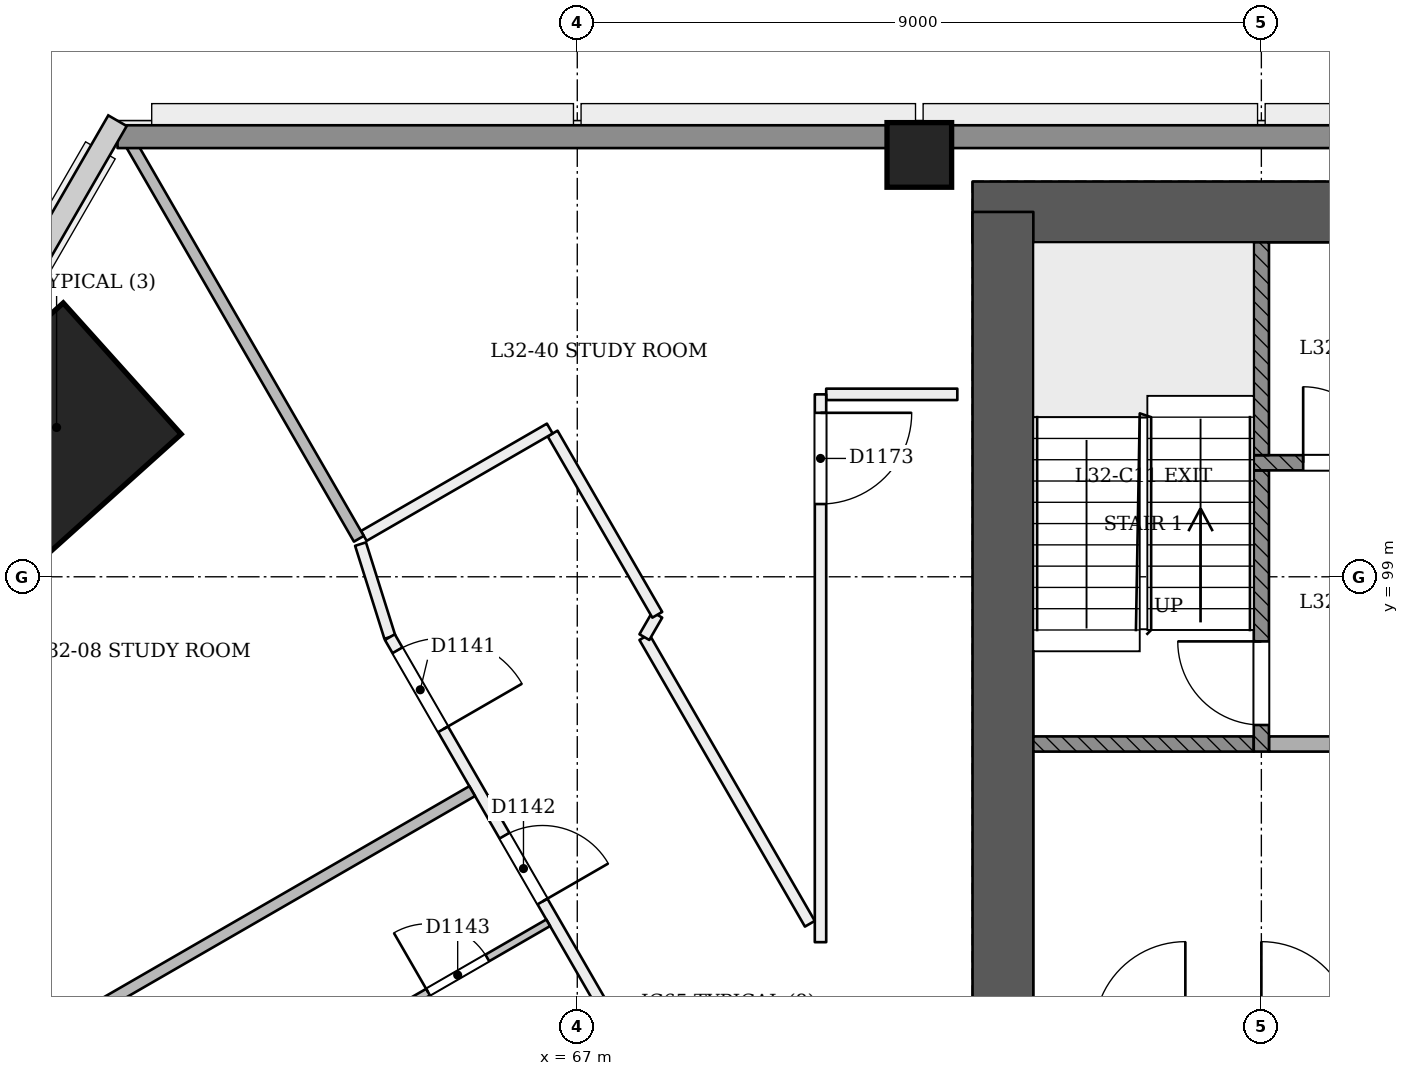
"""IFC4 building model, lengths in metres.
Left out: names, types, materials, properties, quantities, classifications, styles, units other than length and angle.
Written with IfcOpenShell. Run it as: python <this file> out.ifc"""

import sys

from ifc_helpers import new_model, si_unit, direction, frame, frame_2d, origin, origin_2d, place, context, subcontext, project, spatial, rectangle, extrude, element, fill, save


model = new_model("IFC4")
c1 = context("Model", 3, precision=1e-05, world=origin(), true_north=direction((0.0, 1.0)))
c2 = subcontext(c1, "Body", "Model", "MODEL_VIEW")
j1 = project(units=[si_unit("LENGTHUNIT", "METRE"), si_unit("PLANEANGLEUNIT", "RADIAN")], contexts=[c1])
p1 = place(None, origin())
s1 = spatial("IfcSite", under=j1, at=p1, CompositionType="ELEMENT")
p2 = place(p1, origin())
s2 = spatial("IfcBuilding", under=s1, at=p2, CompositionType="ELEMENT")
p3 = place(p2, frame((0.0, 0.0, 127.8)))
s3 = spatial("IfcBuildingStorey", under=s2, at=p3, CompositionType="ELEMENT", Elevation=127.8)
p4 = place(p3, frame((97.4, 103.8, 0.0), z_axis=(0.0, 0.0, 1.0), x_axis=(-1.0, 0.0, 0.0)))
e1 = element("IfcWall", 1, at=p4, inside=s3, PredefinedType="SHEAR", context=c2, shape_type="SweptSolid", body=[
    extrude(rectangle(XDim=25.2, YDim=0.8, at=frame_2d((12.6, 0.0))), origin(), (0.0, 0.0, 1.0), 3.6),
])
p5 = place(p3, frame((72.6, 103.8, 0.0), z_axis=(0.0, 0.0, 1.0), x_axis=(0.0, -1.0, 0.0)))
e2 = element("IfcWall", 2, at=p5, inside=s3, PredefinedType="SHEAR", context=c2, shape_type="SweptSolid", body=[
    extrude(rectangle(XDim=11.2, YDim=0.8, at=frame_2d((5.6, 0.0))), origin(), (0.0, 0.0, 1.0), 3.6),
])
p6 = place(p3, frame((60.116, 100.953, 0.0), z_axis=(0.028403739082, 0.009219352065, 0.999554016126), x_axis=(-0.865118537923, 0.501170103086, 0.019961039903)))
e3 = element("IfcColumn", 3, at=p6, inside=s3, PredefinedType="COLUMN", context=c2, shape_type="SweptSolid", body=[
    extrude(rectangle(XDim=2.32, YDim=2.32, at=origin_2d()), origin(), (0.0, 0.0, 1.0), 3.602),
])
p7 = place(p3, frame((71.5, 104.55, 0.0), z_axis=(0.0, 0.0, 1.0), x_axis=(1.0, 0.0, 0.0)))
e4 = element("IfcColumn", 4, at=p7, inside=s3, PredefinedType="COLUMN", context=c2, shape_type="SweptSolid", body=[
    extrude(rectangle(XDim=0.85, YDim=0.85, at=origin_2d()), origin(), (0.0, 0.0, 1.0), 3.6),
])
p8 = place(p3, frame((64.149, 99.43, 0.0), z_axis=(0.0, 0.0, 1.0), x_axis=(0.300548671062, -0.953766478926, 0.0)))
e5 = element("IfcWall", 5, at=p8, inside=s3, PredefinedType="PARTITIONING", context=c2, shape_type="SweptSolid", body=[
    extrude(rectangle(XDim=1.283, YDim=0.15, at=frame_2d((0.642, 0.0))), origin(), (0.0, 0.0, 1.0), 3.15),
])
p9 = place(p3, frame((64.534, 98.206, 0.0), z_axis=(0.0, 0.0, 1.0), x_axis=(0.499999603446, -0.866025632735, 0.0)))
e6 = element("IfcWall", 6, at=p9, inside=s3, PredefinedType="PARTITIONING", context=c2, shape_type="SweptSolid", body=[
    extrude(rectangle(XDim=40.592, YDim=0.15, at=frame_2d((20.296, 0.0))), origin(), (0.0, 0.0, 1.0), 2.75),
])
p10 = place(p9, frame((0.2, 0.0, 0.0)))
e7 = element("IfcOpeningElement", 7, at=p10, cuts=e6, PredefinedType="OPENING", context=c2, shape_type="SweptSolid", body=[
    extrude(rectangle(XDim=1.2, YDim=2.1, at=frame_2d((0.6, 1.05))), frame((0.0, 0.085, 0.0), z_axis=(0.0, -1.0, 0.0), x_axis=(1.0, 0.0, 0.0)), (0.0, 0.0, 1.0), 0.171),
])
p11 = place(p9, frame((3.016, 0.0, 0.0)))
e8 = element("IfcOpeningElement", 8, at=p11, cuts=e6, PredefinedType="OPENING", context=c2, shape_type="SweptSolid", body=[
    extrude(rectangle(XDim=1.0, YDim=2.1, at=frame_2d((0.5, 1.05))), frame((0.0, 0.085, 0.0), z_axis=(0.0, -1.0, 0.0), x_axis=(1.0, 0.0, 0.0)), (0.0, 0.0, 1.0), 0.171),
])
p12 = place(p9, frame((9.691, 0.0, 0.0)))
e9 = element("IfcOpeningElement", 9, at=p12, cuts=e6, PredefinedType="OPENING", context=c2, shape_type="SweptSolid", body=[
    extrude(rectangle(XDim=1.0, YDim=2.1, at=frame_2d((0.5, 1.05))), frame((0.0, 0.085, 0.0), z_axis=(0.0, -1.0, 0.0), x_axis=(1.0, 0.0, 0.0)), (0.0, 0.0, 1.0), 0.171),
])
p13 = place(p9, frame((11.901, 0.0, 0.0)))
e10 = element("IfcOpeningElement", 10, at=p13, cuts=e6, PredefinedType="OPENING", context=c2, shape_type="SweptSolid", body=[
    extrude(rectangle(XDim=1.0, YDim=2.1, at=frame_2d((0.5, 1.05))), frame((0.0, 0.085, 0.0), z_axis=(0.0, -1.0, 0.0), x_axis=(1.0, 0.0, 0.0)), (0.0, 0.0, 1.0), 0.171),
])
p14 = place(p9, frame((18.576, 0.0, 0.0)))
e11 = element("IfcOpeningElement", 11, at=p14, cuts=e6, PredefinedType="OPENING", context=c2, shape_type="SweptSolid", body=[
    extrude(rectangle(XDim=1.0, YDim=2.1, at=frame_2d((0.5, 1.05))), frame((0.0, 0.085, 0.0), z_axis=(0.0, -1.0, 0.0), x_axis=(1.0, 0.0, 0.0)), (0.0, 0.0, 1.0), 0.171),
])
p15 = place(p9, frame((22.046, 0.0, 0.0)))
e12 = element("IfcOpeningElement", 12, at=p15, cuts=e6, PredefinedType="OPENING", context=c2, shape_type="SweptSolid", body=[
    extrude(rectangle(XDim=1.0, YDim=2.1, at=frame_2d((0.5, 1.05))), frame((0.0, 0.085, 0.0), z_axis=(0.0, -1.0, 0.0), x_axis=(1.0, 0.0, 0.0)), (0.0, 0.0, 1.0), 0.171),
])
p16 = place(p9, frame((27.576, 0.0, 0.0)))
e13 = element("IfcOpeningElement", 13, at=p16, cuts=e6, PredefinedType="OPENING", context=c2, shape_type="SweptSolid", body=[
    extrude(rectangle(XDim=1.0, YDim=2.1, at=frame_2d((0.5, 1.05))), frame((0.0, 0.085, 0.0), z_axis=(0.0, -1.0, 0.0), x_axis=(1.0, 0.0, 0.0)), (0.0, 0.0, 1.0), 0.171),
])
p17 = place(p9, frame((31.046, 0.0, 0.0)))
e14 = element("IfcOpeningElement", 14, at=p17, cuts=e6, PredefinedType="OPENING", context=c2, shape_type="SweptSolid", body=[
    extrude(rectangle(XDim=1.0, YDim=2.1, at=frame_2d((0.5, 1.05))), frame((0.0, 0.085, 0.0), z_axis=(0.0, -1.0, 0.0), x_axis=(1.0, 0.0, 0.0)), (0.0, 0.0, 1.0), 0.171),
])
p18 = place(p9, frame((36.576, 0.0, 0.0)))
e15 = element("IfcOpeningElement", 15, at=p18, cuts=e6, PredefinedType="OPENING", context=c2, shape_type="SweptSolid", body=[
    extrude(rectangle(XDim=1.0, YDim=2.1, at=frame_2d((0.5, 1.05))), frame((0.0, 0.085, 0.0), z_axis=(0.0, -1.0, 0.0), x_axis=(1.0, 0.0, 0.0)), (0.0, 0.0, 1.0), 0.171),
])
p19 = place(p9, frame((39.323, 0.0, 0.0)))
e16 = element("IfcOpeningElement", 16, at=p19, cuts=e6, PredefinedType="OPENING", context=c2, shape_type="SweptSolid", body=[
    extrude(rectangle(XDim=1.0, YDim=2.1, at=frame_2d((0.5, 1.05))), frame((0.0, 0.085, 0.0), z_axis=(0.0, -1.0, 0.0), x_axis=(1.0, 0.0, 0.0)), (0.0, 0.0, 1.0), 0.171),
])
p20 = place(p3, frame((72.0, 101.4, 0.0), z_axis=(0.0, 0.0, 1.0), x_axis=(-1.0, 0.0, 0.0)))
e17 = element("IfcWall", 17, at=p20, inside=s3, PredefinedType="PARTITIONING", context=c2, shape_type="SweptSolid", body=[
    extrude(rectangle(XDim=1.725, YDim=0.15, at=frame_2d((0.863, 0.0))), origin(), (0.0, 0.0, 1.0), 3.15),
])
p21 = place(p3, frame((70.2, 101.4, 0.0), z_axis=(0.0, 0.0, 1.0), x_axis=(0.0, -1.0, 0.0)))
e18 = element("IfcWall", 18, at=p21, inside=s3, PredefinedType="PARTITIONING", context=c2, shape_type="SweptSolid", body=[
    extrude(rectangle(XDim=7.207, YDim=0.15, at=frame_2d((3.604, 0.0))), origin(), (0.0, 0.0, 1.0), 3.15),
])
p22 = place(p21, frame((0.243, 0.0, 0.0)))
e19 = element("IfcOpeningElement", 19, at=p22, cuts=e18, PredefinedType="OPENING", context=c2, shape_type="SweptSolid", body=[
    extrude(rectangle(XDim=1.2, YDim=2.1, at=frame_2d((0.6, 1.05))), frame((0.0, 0.085, 0.0), z_axis=(0.0, -1.0, 0.0), x_axis=(1.0, 0.0, 0.0)), (0.0, 0.0, 1.0), 0.171),
])
p23 = place(p3, frame((70.06, 94.435, 0.0), z_axis=(0.0, 0.0, 1.0), x_axis=(-0.499992644437, 0.866029650479, 0.0)))
e20 = element("IfcWall", 20, at=p23, inside=s3, PredefinedType="PARTITIONING", context=c2, shape_type="SweptSolid", body=[
    extrude(rectangle(XDim=4.354, YDim=0.15, at=frame_2d((2.177, 0.0))), origin(), (0.0, 0.0, 1.0), 3.15),
])
p24 = place(p3, frame((67.883, 98.206, 0.0), z_axis=(0.0, 0.0, 1.0), x_axis=(0.499390178911, 0.866377197996, 0.0)))
e21 = element("IfcWall", 21, at=p24, inside=s3, PredefinedType="PARTITIONING", context=c2, shape_type="SweptSolid", body=[
    extrude(rectangle(XDim=0.339, YDim=0.15, at=frame_2d((0.17, 0.0))), origin(), (0.0, 0.0, 1.0), 3.15),
])
p25 = place(p3, frame((68.052, 98.5, 0.0), z_axis=(0.0, 0.0, 1.0), x_axis=(-0.499991038717, 0.866030577522, 0.0)))
e22 = element("IfcWall", 22, at=p25, inside=s3, PredefinedType="PARTITIONING", context=c2, shape_type="SweptSolid", body=[
    extrude(rectangle(XDim=2.754, YDim=0.15, at=frame_2d((1.377, 0.0))), origin(), (0.0, 0.0, 1.0), 3.15),
])
p26 = place(p3, frame((66.638, 100.95, 0.0), z_axis=(0.0, 0.0, 1.0), x_axis=(-0.866048868473, -0.499959355765, 0.0)))
e23 = element("IfcWall", 23, at=p26, inside=s3, PredefinedType="PARTITIONING", context=c2, shape_type="SweptSolid", body=[
    extrude(rectangle(XDim=2.825, YDim=0.15, at=frame_2d((1.413, 0.0))), origin(), (0.0, 0.0, 1.0), 3.15),
])
p27 = place(p3, frame((60.122, 93.008, 0.0), z_axis=(0.0, 0.0, 1.0), x_axis=(0.866025401434, 0.500000004071, 0.0)))
e24 = element("IfcWall", 24, at=p27, inside=s3, PredefinedType="PARTITIONING", context=c2, shape_type="SweptSolid", body=[
    extrude(rectangle(XDim=6.345, YDim=0.15, at=frame_2d((3.173, 0.0))), origin(), (0.0, 0.0, 1.0), 2.65),
])
p28 = place(p3, frame((64.127, 99.5, 0.0), z_axis=(0.0, 0.0, 1.0), x_axis=(-0.500004896655, 0.866022576681, 0.0)))
e25 = element("IfcWall", 25, at=p28, inside=s3, PredefinedType="PARTITIONING", context=c2, shape_type="SweptSolid", body=[
    extrude(rectangle(XDim=6.235, YDim=0.15, at=frame_2d((3.118, 0.0))), origin(), (0.0, 0.0, 1.0), 2.65),
])
p29 = place(p3, frame((64.171, 93.036, 0.0), z_axis=(0.0, 0.0, 1.0), x_axis=(0.866011447264, 0.500024172624, 0.0)))
e26 = element("IfcWall", 26, at=p29, inside=s3, PredefinedType="PARTITIONING", context=c2, shape_type="SweptSolid", body=[
    extrude(rectangle(XDim=2.825, YDim=0.1, at=frame_2d((1.413, 0.0))), origin(), (0.0, 0.0, 1.0), 3.15),
])
p30 = place(p29, frame((1.0, 0.0, 0.0)))
e27 = element("IfcOpeningElement", 27, at=p30, cuts=e26, PredefinedType="OPENING", context=c2, shape_type="SweptSolid", body=[
    extrude(rectangle(XDim=0.9, YDim=2.1, at=frame_2d((0.45, 1.05))), frame((0.0, 0.061, 0.0), z_axis=(0.0, -1.0, 0.0), x_axis=(1.0, 0.0, 0.0)), (0.0, 0.0, 1.0), 0.121),
])
p31 = place(p3, frame((60.951, 104.79, 0.0), z_axis=(0.0, 0.0, 1.0), x_axis=(1.0, 0.0, 0.0)))
e28 = element("IfcWall", 28, at=p31, inside=s3, PredefinedType="SOLIDWALL", context=c2, shape_type="SweptSolid", body=[
    extrude(rectangle(XDim=48.098, YDim=0.3, at=frame_2d((24.049, 0.0))), origin(), (0.0, 0.0, 1.0), 2.65),
])
p32 = place(p3, frame((73.0, 96.8, 0.0), z_axis=(0.0, 0.0, 1.0), x_axis=(1.0, 0.0, 0.0)))
e29 = element("IfcWall", 29, at=p32, inside=s3, PredefinedType="SOLIDWALL", context=c2, shape_type="SweptSolid", body=[
    extrude(rectangle(XDim=2.9, YDim=0.2, at=frame_2d((1.45, 0.0))), origin(), (0.0, 0.0, 1.0), 3.15),
])
p33 = place(p3, frame((76.0, 96.7, 0.0), z_axis=(0.0, 0.0, 1.0), x_axis=(0.0, 1.0, 0.0)))
e30 = element("IfcWall", 30, at=p33, inside=s3, PredefinedType="SOLIDWALL", context=c2, shape_type="SweptSolid", body=[
    extrude(rectangle(XDim=3.7, YDim=0.2, at=frame_2d((1.85, 0.0))), origin(), (0.0, 0.0, 1.0), 3.15),
])
p34 = place(p33, frame((0.35, 0.0, 0.0)))
e31 = element("IfcOpeningElement", 31, at=p34, cuts=e30, PredefinedType="OPENING", context=c2, shape_type="SweptSolid", body=[
    extrude(rectangle(XDim=1.1, YDim=2.1, at=frame_2d((0.55, 1.05))), frame((0.0, 0.11, 0.0), z_axis=(0.0, -1.0, 0.0), x_axis=(1.0, 0.0, 0.0)), (0.0, 0.0, 1.0), 0.221),
])
p35 = place(p3, frame((76.1, 96.8, 0.0), z_axis=(0.0, 0.0, 1.0), x_axis=(1.0, 0.0, 0.0)))
e32 = element("IfcWall", 32, at=p35, inside=s3, PredefinedType="PARTITIONING", context=c2, shape_type="SweptSolid", body=[
    extrude(rectangle(XDim=1.9, YDim=0.2, at=frame_2d((0.95, 0.0))), origin(), (0.0, 0.0, 1.0), 3.15),
])
p36 = place(p3, frame((75.9, 100.5, 0.0), z_axis=(0.0, 0.0, 1.0), x_axis=(1.0, 0.0, 0.0)))
e33 = element("IfcWall", 33, at=p36, inside=s3, PredefinedType="SOLIDWALL", context=c2, shape_type="SweptSolid", body=[
    extrude(rectangle(XDim=18.2, YDim=0.2, at=frame_2d((9.1, 0.0))), origin(), (0.0, 0.0, 1.0), 3.15),
])
p37 = place(p36, frame((2.6, 0.0, 0.0)))
e34 = element("IfcOpeningElement", 34, at=p37, cuts=e33, PredefinedType="OPENING", context=c2, shape_type="SweptSolid", body=[
    extrude(rectangle(XDim=1.1, YDim=2.1, at=frame_2d((0.55, 1.05))), frame((0.0, 0.11, 0.0), z_axis=(0.0, -1.0, 0.0), x_axis=(1.0, 0.0, 0.0)), (0.0, 0.0, 1.0), 0.221),
])
p38 = place(p36, frame((4.5, 0.0, 0.0)))
e35 = element("IfcOpeningElement", 35, at=p38, cuts=e33, PredefinedType="OPENING", context=c2, shape_type="SweptSolid", body=[
    extrude(rectangle(XDim=1.1, YDim=2.1, at=frame_2d((0.55, 1.05))), frame((0.0, 0.11, 0.0), z_axis=(0.0, -1.0, 0.0), x_axis=(1.0, 0.0, 0.0)), (0.0, 0.0, 1.0), 0.221),
])
p39 = place(p36, frame((6.4, 0.0, 0.0)))
e36 = element("IfcOpeningElement", 36, at=p39, cuts=e33, PredefinedType="OPENING", context=c2, shape_type="SweptSolid", body=[
    extrude(rectangle(XDim=1.1, YDim=2.1, at=frame_2d((0.55, 1.05))), frame((0.0, 0.11, 0.0), z_axis=(0.0, -1.0, 0.0), x_axis=(1.0, 0.0, 0.0)), (0.0, 0.0, 1.0), 0.221),
])
p40 = place(p36, frame((8.3, 0.0, 0.0)))
e37 = element("IfcOpeningElement", 37, at=p40, cuts=e33, PredefinedType="OPENING", context=c2, shape_type="SweptSolid", body=[
    extrude(rectangle(XDim=1.1, YDim=2.1, at=frame_2d((0.55, 1.05))), frame((0.0, 0.11, 0.0), z_axis=(0.0, -1.0, 0.0), x_axis=(1.0, 0.0, 0.0)), (0.0, 0.0, 1.0), 0.221),
])
p41 = place(p36, frame((10.2, 0.0, 0.0)))
e38 = element("IfcOpeningElement", 38, at=p41, cuts=e33, PredefinedType="OPENING", context=c2, shape_type="SweptSolid", body=[
    extrude(rectangle(XDim=1.1, YDim=2.1, at=frame_2d((0.55, 1.05))), frame((0.0, 0.11, 0.0), z_axis=(0.0, -1.0, 0.0), x_axis=(1.0, 0.0, 0.0)), (0.0, 0.0, 1.0), 0.221),
])
p42 = place(p36, frame((12.1, 0.0, 0.0)))
e39 = element("IfcOpeningElement", 39, at=p42, cuts=e33, PredefinedType="OPENING", context=c2, shape_type="SweptSolid", body=[
    extrude(rectangle(XDim=1.1, YDim=2.1, at=frame_2d((0.55, 1.05))), frame((0.0, 0.11, 0.0), z_axis=(0.0, -1.0, 0.0), x_axis=(1.0, 0.0, 0.0)), (0.0, 0.0, 1.0), 0.221),
])
p43 = place(p36, frame((14.0, 0.0, 0.0)))
e40 = element("IfcOpeningElement", 40, at=p43, cuts=e33, PredefinedType="OPENING", context=c2, shape_type="SweptSolid", body=[
    extrude(rectangle(XDim=1.1, YDim=2.1, at=frame_2d((0.55, 1.05))), frame((0.0, 0.11, 0.0), z_axis=(0.0, -1.0, 0.0), x_axis=(1.0, 0.0, 0.0)), (0.0, 0.0, 1.0), 0.221),
])
p44 = place(p36, frame((0.65, 0.0, 0.0)))
e41 = element("IfcOpeningElement", 41, at=p44, cuts=e33, PredefinedType="OPENING", context=c2, shape_type="SweptSolid", body=[
    extrude(rectangle(XDim=1.0, YDim=2.1, at=frame_2d((0.5, 1.05))), frame((0.0, 0.11, 0.0), z_axis=(0.0, -1.0, 0.0), x_axis=(1.0, 0.0, 0.0)), (0.0, 0.0, 1.0), 0.221),
])
p45 = place(p36, frame((16.3, 0.0, 0.0)))
e42 = element("IfcOpeningElement", 42, at=p45, cuts=e33, PredefinedType="OPENING", context=c2, shape_type="SweptSolid", body=[
    extrude(rectangle(XDim=1.0, YDim=2.1, at=frame_2d((0.5, 1.05))), frame((0.0, 0.11, 0.0), z_axis=(0.0, -1.0, 0.0), x_axis=(1.0, 0.0, 0.0)), (0.0, 0.0, 1.0), 0.221),
])
p46 = place(p3, frame((76.0, 100.6, 0.0), z_axis=(0.0, 0.0, 1.0), x_axis=(0.0, 1.0, 0.0)))
e43 = element("IfcWall", 43, at=p46, inside=s3, PredefinedType="SOLIDWALL", context=c2, shape_type="SweptSolid", body=[
    extrude(rectangle(XDim=2.8, YDim=0.2, at=frame_2d((1.4, 0.0))), origin(), (0.0, 0.0, 1.0), 3.15),
])
p47 = place(p10, origin())
e44 = element("IfcDoor", 44, at=p47, inside=s3, OperationType="SINGLE_SWING_RIGHT", PredefinedType="NOTDEFINED", context=c2, shape_type="SweptSolid", body=[
    extrude(rectangle(XDim=1.2, YDim=2.1, at=frame_2d((0.6, 1.05))), frame((0.0, 0.025, 0.0), z_axis=(0.0, -1.0, 0.0), x_axis=(1.0, 0.0, 0.0)), (0.0, 0.0, 1.0), 0.05),
])
fill(e7, e44)
p48 = place(p11, origin())
e45 = element("IfcDoor", 45, at=p48, inside=s3, OperationType="SINGLE_SWING_RIGHT", PredefinedType="NOTDEFINED", context=c2, shape_type="SweptSolid", body=[
    extrude(rectangle(XDim=1.0, YDim=2.1, at=frame_2d((0.5, 1.05))), frame((0.0, 0.025, 0.0), z_axis=(0.0, -1.0, 0.0), x_axis=(1.0, 0.0, 0.0)), (0.0, 0.0, 1.0), 0.05),
])
fill(e8, e45)
p49 = place(p30, origin())
e46 = element("IfcDoor", 46, at=p49, inside=s3, OperationType="SINGLE_SWING_LEFT", PredefinedType="NOTDEFINED", context=c2, shape_type="SweptSolid", body=[
    extrude(rectangle(XDim=0.9, YDim=2.1, at=frame_2d((0.45, 1.05))), frame((0.0, 0.025, 0.0), z_axis=(0.0, -1.0, 0.0), x_axis=(1.0, 0.0, 0.0)), (0.0, 0.0, 1.0), 0.05),
])
fill(e27, e46)
p50 = place(p22, origin())
e47 = element("IfcDoor", 47, at=p50, inside=s3, OperationType="SINGLE_SWING_LEFT", PredefinedType="NOTDEFINED", context=c2, shape_type="SweptSolid", body=[
    extrude(rectangle(XDim=1.2, YDim=2.1, at=frame_2d((0.6, 1.05))), frame((0.0, 0.025, 0.0), z_axis=(0.0, -1.0, 0.0), x_axis=(1.0, 0.0, 0.0)), (0.0, 0.0, 1.0), 0.05),
])
fill(e19, e47)
p51 = place(p34, origin())
e48 = element("IfcDoor", 48, at=p51, inside=s3, OperationType="SINGLE_SWING_RIGHT", PredefinedType="NOTDEFINED", context=c2, shape_type="SweptSolid", body=[
    extrude(rectangle(XDim=1.1, YDim=2.1, at=frame_2d((0.55, 1.05))), frame((0.0, 0.025, 0.0), z_axis=(0.0, -1.0, 0.0), x_axis=(1.0, 0.0, 0.0)), (0.0, 0.0, 1.0), 0.05),
])
fill(e31, e48)
p52 = place(p44, origin())
e49 = element("IfcDoor", 49, at=p52, inside=s3, OperationType="SINGLE_SWING_LEFT", PredefinedType="NOTDEFINED", context=c2, shape_type="SweptSolid", body=[
    extrude(rectangle(XDim=1.0, YDim=2.1, at=frame_2d((0.5, 1.05))), frame((0.0, 0.025, 0.0), z_axis=(0.0, -1.0, 0.0), x_axis=(1.0, 0.0, 0.0)), (0.0, 0.0, 1.0), 0.05),
])
fill(e41, e49)
save(model, sys.argv[1])
